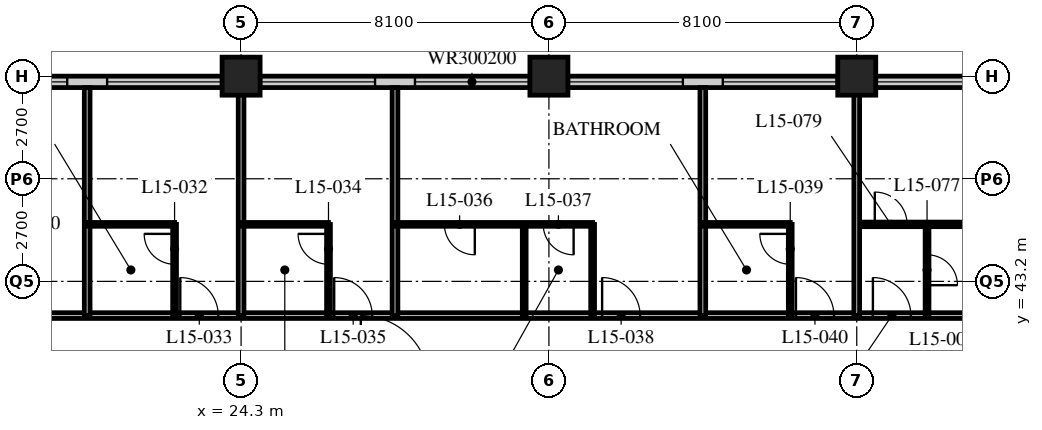
"""IFC4 building model, lengths in metres.
Left out: names, types, materials, properties, quantities, classifications, styles, units other than length and angle.
Written with IfcOpenShell. Run it as: python <this file> out.ifc"""

import sys

from ifc_helpers import new_model, si_unit, direction, frame, frame_2d, origin, origin_2d, place, context, subcontext, project, spatial, rectangle, hollow_rectangle, extrude, element, fill, save


model = new_model("IFC4")
c1 = context("Model", 3, precision=1e-05, world=origin(), true_north=direction((0.0, 1.0)))
c2 = subcontext(c1, "Body", "Model", "MODEL_VIEW")
j1 = project(units=[si_unit("LENGTHUNIT", "METRE"), si_unit("PLANEANGLEUNIT", "RADIAN")], contexts=[c1])
p1 = place(None, origin())
s1 = spatial("IfcSite", under=j1, at=p1, CompositionType="ELEMENT")
p2 = place(p1, origin())
s2 = spatial("IfcBuilding", under=s1, at=p2, CompositionType="ELEMENT")
p3 = place(p2, frame((0.0, 0.0, 63.6)))
s3 = spatial("IfcBuildingStorey", under=s2, at=p3, CompositionType="ELEMENT", Elevation=63.6)
for number, where, z_axis, x_axis in (
    (1, (24.3, 48.6, 0.0), (0.0, 0.0, 1.0), (1.0, 0.0, 0.0)),
    (2, (32.4, 48.6, 0.0), (0.0, 0.0, 1.0), (1.0, 0.0, 0.0)),
    (3, (40.5, 48.6, 0.0), (0.0, 0.0, 1.0), (1.0, 0.0, 0.0)),
):
    element("IfcColumn", number, at=place(p3, frame(where, z_axis=z_axis, x_axis=x_axis)), inside=s3, PredefinedType="COLUMN", context=c2, shape_type="SweptSolid", body=[
        extrude(hollow_rectangle(XDim=1.0, YDim=1.0, WallThickness=0.1, at=origin_2d()), origin(), (0.0, 0.0, 1.0), 3.4),
    ])
p4 = place(p3, frame((48.3, 48.45, 0.0), z_axis=(0.0, 0.0, 1.0), x_axis=(-1.0, 0.0, 0.0)))
e4 = element("IfcWall", 4, at=p4, inside=s3, PredefinedType="SOLIDWALL", context=c2, shape_type="SweptSolid", body=[
    extrude(rectangle(XDim=40.2, YDim=0.3, at=frame_2d((20.1, 0.0))), origin(), (0.0, 0.0, 1.0), 3.19),
])
p5 = place(p4, frame((0.225, 0.0, 0.9)))
e5 = element("IfcOpeningElement", 5, at=p5, cuts=e4, PredefinedType="OPENING", context=c2, shape_type="SweptSolid", body=[
    extrude(rectangle(XDim=3.0, YDim=2.0, at=frame_2d((1.5, 1.0))), frame((0.0, 0.16, 0.0), z_axis=(0.0, -1.0, 0.0), x_axis=(1.0, 0.0, 0.0)), (0.0, 0.0, 1.0), 0.32),
])
p6 = place(p4, frame((4.275, 0.0, 0.9)))
e6 = element("IfcOpeningElement", 6, at=p6, cuts=e4, PredefinedType="OPENING", context=c2, shape_type="SweptSolid", body=[
    extrude(rectangle(XDim=3.0, YDim=2.0, at=frame_2d((1.5, 1.0))), frame((0.0, 0.16, 0.0), z_axis=(0.0, -1.0, 0.0), x_axis=(1.0, 0.0, 0.0)), (0.0, 0.0, 1.0), 0.32),
])
p7 = place(p4, frame((8.325, 0.0, 0.9)))
e7 = element("IfcOpeningElement", 7, at=p7, cuts=e4, PredefinedType="OPENING", context=c2, shape_type="SweptSolid", body=[
    extrude(rectangle(XDim=3.0, YDim=2.0, at=frame_2d((1.5, 1.0))), frame((0.0, 0.16, 0.0), z_axis=(0.0, -1.0, 0.0), x_axis=(1.0, 0.0, 0.0)), (0.0, 0.0, 1.0), 0.32),
])
p8 = place(p4, frame((12.375, 0.0, 0.9)))
e8 = element("IfcOpeningElement", 8, at=p8, cuts=e4, PredefinedType="OPENING", context=c2, shape_type="SweptSolid", body=[
    extrude(rectangle(XDim=3.0, YDim=2.0, at=frame_2d((1.5, 1.0))), frame((0.0, 0.16, 0.0), z_axis=(0.0, -1.0, 0.0), x_axis=(1.0, 0.0, 0.0)), (0.0, 0.0, 1.0), 0.32),
])
p9 = place(p4, frame((16.425, 0.0, 0.9)))
e9 = element("IfcOpeningElement", 9, at=p9, cuts=e4, PredefinedType="OPENING", context=c2, shape_type="SweptSolid", body=[
    extrude(rectangle(XDim=3.0, YDim=2.0, at=frame_2d((1.5, 1.0))), frame((0.0, 0.16, 0.0), z_axis=(0.0, -1.0, 0.0), x_axis=(1.0, 0.0, 0.0)), (0.0, 0.0, 1.0), 0.32),
])
p10 = place(p4, frame((20.475, 0.0, 0.9)))
e10 = element("IfcOpeningElement", 10, at=p10, cuts=e4, PredefinedType="OPENING", context=c2, shape_type="SweptSolid", body=[
    extrude(rectangle(XDim=3.0, YDim=2.0, at=frame_2d((1.5, 1.0))), frame((0.0, 0.16, 0.0), z_axis=(0.0, -1.0, 0.0), x_axis=(1.0, 0.0, 0.0)), (0.0, 0.0, 1.0), 0.32),
])
p11 = place(p4, frame((24.525, 0.0, 0.9)))
e11 = element("IfcOpeningElement", 11, at=p11, cuts=e4, PredefinedType="OPENING", context=c2, shape_type="SweptSolid", body=[
    extrude(rectangle(XDim=3.0, YDim=2.0, at=frame_2d((1.5, 1.0))), frame((0.0, 0.16, 0.0), z_axis=(0.0, -1.0, 0.0), x_axis=(1.0, 0.0, 0.0)), (0.0, 0.0, 1.0), 0.32),
])
p12 = place(p4, frame((28.575, 0.0, 0.9)))
e12 = element("IfcOpeningElement", 12, at=p12, cuts=e4, PredefinedType="OPENING", context=c2, shape_type="SweptSolid", body=[
    extrude(rectangle(XDim=3.0, YDim=2.0, at=frame_2d((1.5, 1.0))), frame((0.0, 0.16, 0.0), z_axis=(0.0, -1.0, 0.0), x_axis=(1.0, 0.0, 0.0)), (0.0, 0.0, 1.0), 0.32),
])
p13 = place(p4, frame((32.625, 0.0, 0.9)))
e13 = element("IfcOpeningElement", 13, at=p13, cuts=e4, PredefinedType="OPENING", context=c2, shape_type="SweptSolid", body=[
    extrude(rectangle(XDim=3.0, YDim=2.0, at=frame_2d((1.5, 1.0))), frame((0.0, 0.16, 0.0), z_axis=(0.0, -1.0, 0.0), x_axis=(1.0, 0.0, 0.0)), (0.0, 0.0, 1.0), 0.32),
])
p14 = place(p4, frame((36.675, 0.0, 0.9)))
e14 = element("IfcOpeningElement", 14, at=p14, cuts=e4, PredefinedType="OPENING", context=c2, shape_type="SweptSolid", body=[
    extrude(rectangle(XDim=3.0, YDim=2.0, at=frame_2d((1.5, 1.0))), frame((0.0, 0.16, 0.0), z_axis=(0.0, -1.0, 0.0), x_axis=(1.0, 0.0, 0.0)), (0.0, 0.0, 1.0), 0.32),
])
p15 = place(p3, frame((8.1, 42.3, 0.0), z_axis=(0.0, 0.0, 1.0), x_axis=(1.0, 0.0, 0.0)))
e15 = element("IfcWall", 15, at=p15, inside=s3, PredefinedType="PARTITIONING", context=c2, shape_type="SweptSolid", body=[
    extrude(rectangle(XDim=36.45, YDim=0.15, at=frame_2d((18.225, 0.0))), origin(), (0.0, 0.0, 1.0), 3.19),
])
p16 = place(p15, frame((9.5, 0.0, 0.0)))
e16 = element("IfcOpeningElement", 16, at=p16, cuts=e15, PredefinedType="OPENING", context=c2, shape_type="SweptSolid", body=[
    extrude(rectangle(XDim=1.0, YDim=2.1, at=frame_2d((0.5, 1.05))), frame((0.0, 0.085, 0.0), z_axis=(0.0, -1.0, 0.0), x_axis=(1.0, 0.0, 0.0)), (0.0, 0.0, 1.0), 0.17),
])
p17 = place(p15, frame((14.6, 0.0, 0.0)))
e17 = element("IfcOpeningElement", 17, at=p17, cuts=e15, PredefinedType="OPENING", context=c2, shape_type="SweptSolid", body=[
    extrude(rectangle(XDim=1.0, YDim=2.1, at=frame_2d((0.5, 1.05))), frame((0.0, 0.085, 0.0), z_axis=(0.0, -1.0, 0.0), x_axis=(1.0, 0.0, 0.0)), (0.0, 0.0, 1.0), 0.17),
])
p18 = place(p15, frame((18.65, 0.0, 0.0)))
e18 = element("IfcOpeningElement", 18, at=p18, cuts=e15, PredefinedType="OPENING", context=c2, shape_type="SweptSolid", body=[
    extrude(rectangle(XDim=1.0, YDim=2.1, at=frame_2d((0.5, 1.05))), frame((0.0, 0.085, 0.0), z_axis=(0.0, -1.0, 0.0), x_axis=(1.0, 0.0, 0.0)), (0.0, 0.0, 1.0), 0.17),
])
p19 = place(p15, frame((25.7, 0.0, 0.0)))
e19 = element("IfcOpeningElement", 19, at=p19, cuts=e15, PredefinedType="OPENING", context=c2, shape_type="SweptSolid", body=[
    extrude(rectangle(XDim=1.0, YDim=2.1, at=frame_2d((0.5, 1.05))), frame((0.0, 0.085, 0.0), z_axis=(0.0, -1.0, 0.0), x_axis=(1.0, 0.0, 0.0)), (0.0, 0.0, 1.0), 0.17),
])
p20 = place(p15, frame((30.8, 0.0, 0.0)))
e20 = element("IfcOpeningElement", 20, at=p20, cuts=e15, PredefinedType="OPENING", context=c2, shape_type="SweptSolid", body=[
    extrude(rectangle(XDim=1.0, YDim=2.1, at=frame_2d((0.5, 1.05))), frame((0.0, 0.085, 0.0), z_axis=(0.0, -1.0, 0.0), x_axis=(1.0, 0.0, 0.0)), (0.0, 0.0, 1.0), 0.17),
])
p21 = place(p15, frame((32.825, 0.0, 0.0)))
e21 = element("IfcOpeningElement", 21, at=p21, cuts=e15, PredefinedType="OPENING", context=c2, shape_type="SweptSolid", body=[
    extrude(rectangle(XDim=1.0, YDim=2.1, at=frame_2d((0.5, 1.05))), frame((0.0, 0.085, 0.0), z_axis=(0.0, -1.0, 0.0), x_axis=(1.0, 0.0, 0.0)), (0.0, 0.0, 1.0), 0.17),
])
p22 = place(p15, frame((2.625, 0.0, 0.0)))
e22 = element("IfcOpeningElement", 22, at=p22, cuts=e15, PredefinedType="OPENING", context=c2, shape_type="SweptSolid", body=[
    extrude(rectangle(XDim=1.0, YDim=2.1, at=frame_2d((0.5, 1.05))), frame((0.0, 0.085, 0.0), z_axis=(0.0, -1.0, 0.0), x_axis=(1.0, 0.0, 0.0)), (0.0, 0.0, 1.0), 0.17),
])
p23 = place(p3, frame((20.25, 42.3, 0.0), z_axis=(0.0, 0.0, 1.0), x_axis=(0.0, 1.0, 0.0)))
e23 = element("IfcWall", 23, at=p23, inside=s3, PredefinedType="PARTITIONING", context=c2, shape_type="SweptSolid", body=[
    extrude(rectangle(XDim=6.0, YDim=0.15, at=frame_2d((3.0, 0.0))), origin(), (0.0, 0.0, 1.0), 3.19),
])
p24 = place(p3, frame((20.25, 44.7, 0.0), z_axis=(0.0, 0.0, 1.0), x_axis=(1.0, 0.0, 0.0)))
e24 = element("IfcWall", 24, at=p24, inside=s3, PredefinedType="PARTITIONING", context=c2, shape_type="SweptSolid", body=[
    extrude(rectangle(XDim=2.3, YDim=0.1, at=frame_2d((1.15, 0.0))), origin(), (0.0, 0.0, 1.0), 3.19),
])
p25 = place(p3, frame((22.55, 42.3, 0.0), z_axis=(0.0, 0.0, 1.0), x_axis=(0.0, 1.0, 0.0)))
e25 = element("IfcWall", 25, at=p25, inside=s3, PredefinedType="PARTITIONING", context=c2, shape_type="SweptSolid", body=[
    extrude(rectangle(XDim=2.4, YDim=0.1, at=frame_2d((1.2, 0.0))), origin(), (0.0, 0.0, 1.0), 3.19),
])
p26 = place(p25, frame((1.35, 0.0, 0.0)))
e26 = element("IfcOpeningElement", 26, at=p26, cuts=e25, PredefinedType="OPENING", context=c2, shape_type="SweptSolid", body=[
    extrude(rectangle(XDim=0.8, YDim=2.1, at=frame_2d((0.4, 1.05))), frame((0.0, 0.06, 0.0), z_axis=(0.0, -1.0, 0.0), x_axis=(1.0, 0.0, 0.0)), (0.0, 0.0, 1.0), 0.12),
])
p27 = place(p3, frame((24.3, 42.3, 0.0), z_axis=(0.0, 0.0, 1.0), x_axis=(0.0, 1.0, 0.0)))
e27 = element("IfcWall", 27, at=p27, inside=s3, PredefinedType="PARTITIONING", context=c2, shape_type="SweptSolid", body=[
    extrude(rectangle(XDim=6.0, YDim=0.15, at=frame_2d((3.0, 0.0))), origin(), (0.0, 0.0, 1.0), 2.578),
])
p28 = place(p3, frame((24.3, 44.7, 0.0), z_axis=(0.0, 0.0, 1.0), x_axis=(1.0, 0.0, 0.0)))
e28 = element("IfcWall", 28, at=p28, inside=s3, PredefinedType="PARTITIONING", context=c2, shape_type="SweptSolid", body=[
    extrude(rectangle(XDim=2.3, YDim=0.1, at=frame_2d((1.15, 0.0))), origin(), (0.0, 0.0, 1.0), 3.19),
])
p29 = place(p3, frame((26.6, 42.3, 0.0), z_axis=(0.0, 0.0, 1.0), x_axis=(0.0, 1.0, 0.0)))
e29 = element("IfcWall", 29, at=p29, inside=s3, PredefinedType="PARTITIONING", context=c2, shape_type="SweptSolid", body=[
    extrude(rectangle(XDim=2.4, YDim=0.1, at=frame_2d((1.2, 0.0))), origin(), (0.0, 0.0, 1.0), 3.19),
])
p30 = place(p29, frame((1.35, 0.0, 0.0)))
e30 = element("IfcOpeningElement", 30, at=p30, cuts=e29, PredefinedType="OPENING", context=c2, shape_type="SweptSolid", body=[
    extrude(rectangle(XDim=0.8, YDim=2.1, at=frame_2d((0.4, 1.05))), frame((0.0, 0.06, 0.0), z_axis=(0.0, -1.0, 0.0), x_axis=(1.0, 0.0, 0.0)), (0.0, 0.0, 1.0), 0.12),
])
p31 = place(p3, frame((28.35, 42.3, 0.0), z_axis=(0.0, 0.0, 1.0), x_axis=(0.0, 1.0, 0.0)))
e31 = element("IfcWall", 31, at=p31, inside=s3, PredefinedType="PARTITIONING", context=c2, shape_type="SweptSolid", body=[
    extrude(rectangle(XDim=6.0, YDim=0.15, at=frame_2d((3.0, 0.0))), origin(), (0.0, 0.0, 1.0), 3.19),
])
p32 = place(p3, frame((28.35, 44.7, 0.0), z_axis=(0.0, 0.0, 1.0), x_axis=(1.0, 0.0, 0.0)))
e32 = element("IfcWall", 32, at=p32, inside=s3, PredefinedType="PARTITIONING", context=c2, shape_type="SweptSolid", body=[
    extrude(rectangle(XDim=5.2, YDim=0.1, at=frame_2d((2.6, 0.0))), origin(), (0.0, 0.0, 1.0), 3.19),
])
p33 = place(p32, frame((1.3, 0.0, 0.0)))
e33 = element("IfcOpeningElement", 33, at=p33, cuts=e32, PredefinedType="OPENING", context=c2, shape_type="SweptSolid", body=[
    extrude(rectangle(XDim=0.8, YDim=2.1, at=frame_2d((0.4, 1.05))), frame((0.0, 0.06, 0.0), z_axis=(0.0, -1.0, 0.0), x_axis=(1.0, 0.0, 0.0)), (0.0, 0.0, 1.0), 0.12),
])
p34 = place(p32, frame((3.9, 0.0, 0.0)))
e34 = element("IfcOpeningElement", 34, at=p34, cuts=e32, PredefinedType="OPENING", context=c2, shape_type="SweptSolid", body=[
    extrude(rectangle(XDim=0.8, YDim=2.1, at=frame_2d((0.4, 1.05))), frame((0.0, 0.06, 0.0), z_axis=(0.0, -1.0, 0.0), x_axis=(1.0, 0.0, 0.0)), (0.0, 0.0, 1.0), 0.12),
])
for number, where, z_axis, x_axis in (
    (35, (31.75, 42.3, 0.0), (0.0, 0.0, 1.0), (0.0, 1.0, 0.0)),
    (36, (33.55, 42.3, 0.0), (0.0, 0.0, 1.0), (0.0, 1.0, 0.0)),
):
    element("IfcWall", number, at=place(p3, frame(where, z_axis=z_axis, x_axis=x_axis)), inside=s3, PredefinedType="PARTITIONING", context=c2, shape_type="SweptSolid", body=[
        extrude(rectangle(XDim=2.4, YDim=0.1, at=frame_2d((1.2, 0.0))), origin(), (0.0, 0.0, 1.0), 3.19),
    ])
p35 = place(p3, frame((36.45, 42.3, 0.0), z_axis=(0.0, 0.0, 1.0), x_axis=(0.0, 1.0, 0.0)))
e37 = element("IfcWall", 37, at=p35, inside=s3, PredefinedType="PARTITIONING", context=c2, shape_type="SweptSolid", body=[
    extrude(rectangle(XDim=6.0, YDim=0.15, at=frame_2d((3.0, 0.0))), origin(), (0.0, 0.0, 1.0), 3.19),
])
p36 = place(p3, frame((36.45, 44.7, 0.0), z_axis=(0.0, 0.0, 1.0), x_axis=(1.0, 0.0, 0.0)))
e38 = element("IfcWall", 38, at=p36, inside=s3, PredefinedType="PARTITIONING", context=c2, shape_type="SweptSolid", body=[
    extrude(rectangle(XDim=2.3, YDim=0.1, at=frame_2d((1.15, 0.0))), origin(), (0.0, 0.0, 1.0), 3.19),
])
p37 = place(p3, frame((38.75, 42.3, 0.0), z_axis=(0.0, 0.0, 1.0), x_axis=(0.0, 1.0, 0.0)))
e39 = element("IfcWall", 39, at=p37, inside=s3, PredefinedType="PARTITIONING", context=c2, shape_type="SweptSolid", body=[
    extrude(rectangle(XDim=2.4, YDim=0.1, at=frame_2d((1.2, 0.0))), origin(), (0.0, 0.0, 1.0), 3.19),
])
p38 = place(p37, frame((1.35, 0.0, 0.0)))
e40 = element("IfcOpeningElement", 40, at=p38, cuts=e39, PredefinedType="OPENING", context=c2, shape_type="SweptSolid", body=[
    extrude(rectangle(XDim=0.8, YDim=2.1, at=frame_2d((0.4, 1.05))), frame((0.0, 0.06, 0.0), z_axis=(0.0, -1.0, 0.0), x_axis=(1.0, 0.0, 0.0)), (0.0, 0.0, 1.0), 0.12),
])
p39 = place(p3, frame((40.5, 44.7, 0.0), z_axis=(0.0, 0.0, 1.0), x_axis=(1.0, 0.0, 0.0)))
e41 = element("IfcWall", 41, at=p39, inside=s3, PredefinedType="PARTITIONING", context=c2, shape_type="SweptSolid", body=[
    extrude(rectangle(XDim=4.05, YDim=0.12, at=frame_2d((2.025, 0.0))), origin(), (0.0, 0.0, 1.0), 3.19),
])
p40 = place(p39, frame((0.475, 0.0, 0.0)))
e42 = element("IfcOpeningElement", 42, at=p40, cuts=e41, PredefinedType="OPENING", context=c2, shape_type="SweptSolid", body=[
    extrude(rectangle(XDim=0.85, YDim=2.1, at=frame_2d((0.425, 1.05))), frame((0.0, 0.07, 0.0), z_axis=(0.0, -1.0, 0.0), x_axis=(1.0, 0.0, 0.0)), (0.0, 0.0, 1.0), 0.14),
])
p41 = place(p3, frame((42.35, 42.3, 0.0), z_axis=(0.0, 0.0, 1.0), x_axis=(0.0, 1.0, 0.0)))
e43 = element("IfcWall", 43, at=p41, inside=s3, PredefinedType="PARTITIONING", context=c2, shape_type="SweptSolid", body=[
    extrude(rectangle(XDim=2.4, YDim=0.1, at=frame_2d((1.2, 0.0))), origin(), (0.0, 0.0, 1.0), 3.19),
])
p42 = place(p41, frame((0.8, 0.0, 0.0)))
e44 = element("IfcOpeningElement", 44, at=p42, cuts=e43, PredefinedType="OPENING", context=c2, shape_type="SweptSolid", body=[
    extrude(rectangle(XDim=0.8, YDim=2.1, at=frame_2d((0.4, 1.05))), frame((0.0, 0.06, 0.0), z_axis=(0.0, -1.0, 0.0), x_axis=(1.0, 0.0, 0.0)), (0.0, 0.0, 1.0), 0.12),
])
p43 = place(p3, frame((40.5, 42.3, 0.0), z_axis=(0.0, 0.0, 1.0), x_axis=(0.0, 1.0, 0.0)))
e45 = element("IfcWall", 45, at=p43, inside=s3, PredefinedType="PARTITIONING", context=c2, shape_type="SweptSolid", body=[
    extrude(rectangle(XDim=6.0, YDim=0.15, at=frame_2d((3.0, 0.0))), origin(), (0.0, 0.0, 1.0), 2.578),
])
p44 = place(p6, origin())
e46 = element("IfcWindow", 46, at=p44, inside=s3, PartitioningType="SINGLE_PANEL", PredefinedType="WINDOW", context=c2, shape_type="SweptSolid", body=[
    extrude(rectangle(XDim=3.0, YDim=2.0, at=frame_2d((1.5, 1.0))), frame((0.0, 0.03, 0.0), z_axis=(0.0, -1.0, 0.0), x_axis=(1.0, 0.0, 0.0)), (0.0, 0.0, 1.0), 0.06),
])
fill(e6, e46)
p45 = place(p7, origin())
e47 = element("IfcWindow", 47, at=p45, inside=s3, PartitioningType="SINGLE_PANEL", PredefinedType="WINDOW", context=c2, shape_type="SweptSolid", body=[
    extrude(rectangle(XDim=3.0, YDim=2.0, at=frame_2d((1.5, 1.0))), frame((0.0, 0.03, 0.0), z_axis=(0.0, -1.0, 0.0), x_axis=(1.0, 0.0, 0.0)), (0.0, 0.0, 1.0), 0.06),
])
fill(e7, e47)
p46 = place(p8, origin())
e48 = element("IfcWindow", 48, at=p46, inside=s3, PartitioningType="SINGLE_PANEL", PredefinedType="WINDOW", context=c2, shape_type="SweptSolid", body=[
    extrude(rectangle(XDim=3.0, YDim=2.0, at=frame_2d((1.5, 1.0))), frame((0.0, 0.03, 0.0), z_axis=(0.0, -1.0, 0.0), x_axis=(1.0, 0.0, 0.0)), (0.0, 0.0, 1.0), 0.06),
])
fill(e8, e48)
p47 = place(p9, origin())
e49 = element("IfcWindow", 49, at=p47, inside=s3, PartitioningType="SINGLE_PANEL", PredefinedType="WINDOW", context=c2, shape_type="SweptSolid", body=[
    extrude(rectangle(XDim=3.0, YDim=2.0, at=frame_2d((1.5, 1.0))), frame((0.0, 0.03, 0.0), z_axis=(0.0, -1.0, 0.0), x_axis=(1.0, 0.0, 0.0)), (0.0, 0.0, 1.0), 0.06),
])
fill(e9, e49)
p48 = place(p10, origin())
e50 = element("IfcWindow", 50, at=p48, inside=s3, PartitioningType="SINGLE_PANEL", PredefinedType="WINDOW", context=c2, shape_type="SweptSolid", body=[
    extrude(rectangle(XDim=3.0, YDim=2.0, at=frame_2d((1.5, 1.0))), frame((0.0, 0.03, 0.0), z_axis=(0.0, -1.0, 0.0), x_axis=(1.0, 0.0, 0.0)), (0.0, 0.0, 1.0), 0.06),
])
fill(e10, e50)
p49 = place(p11, origin())
e51 = element("IfcWindow", 51, at=p49, inside=s3, PartitioningType="SINGLE_PANEL", PredefinedType="WINDOW", context=c2, shape_type="SweptSolid", body=[
    extrude(rectangle(XDim=3.0, YDim=2.0, at=frame_2d((1.5, 1.0))), frame((0.0, 0.03, 0.0), z_axis=(0.0, -1.0, 0.0), x_axis=(1.0, 0.0, 0.0)), (0.0, 0.0, 1.0), 0.06),
])
fill(e11, e51)
p50 = place(p12, origin())
e52 = element("IfcWindow", 52, at=p50, inside=s3, PartitioningType="SINGLE_PANEL", PredefinedType="WINDOW", context=c2, shape_type="SweptSolid", body=[
    extrude(rectangle(XDim=3.0, YDim=2.0, at=frame_2d((1.5, 1.0))), frame((0.0, 0.03, 0.0), z_axis=(0.0, -1.0, 0.0), x_axis=(1.0, 0.0, 0.0)), (0.0, 0.0, 1.0), 0.06),
])
fill(e12, e52)
p51 = place(p26, origin())
e53 = element("IfcDoor", 53, at=p51, inside=s3, OperationType="SINGLE_SWING_RIGHT", PredefinedType="DOOR", context=c2, shape_type="SweptSolid", body=[
    extrude(rectangle(XDim=0.8, YDim=2.1, at=frame_2d((0.4, 1.05))), frame((0.0, 0.025, 0.0), z_axis=(0.0, -1.0, 0.0), x_axis=(1.0, 0.0, 0.0)), (0.0, 0.0, 1.0), 0.05),
])
fill(e26, e53)
p52 = place(p17, origin())
e54 = element("IfcDoor", 54, at=p52, inside=s3, OperationType="SINGLE_SWING_LEFT", PredefinedType="DOOR", context=c2, shape_type="SweptSolid", body=[
    extrude(rectangle(XDim=1.0, YDim=2.1, at=frame_2d((0.5, 1.05))), frame((0.0, 0.025, 0.0), z_axis=(0.0, -1.0, 0.0), x_axis=(1.0, 0.0, 0.0)), (0.0, 0.0, 1.0), 0.05),
])
fill(e17, e54)
p53 = place(p30, origin())
e55 = element("IfcDoor", 55, at=p53, inside=s3, OperationType="SINGLE_SWING_RIGHT", PredefinedType="DOOR", context=c2, shape_type="SweptSolid", body=[
    extrude(rectangle(XDim=0.8, YDim=2.1, at=frame_2d((0.4, 1.05))), frame((0.0, 0.025, 0.0), z_axis=(0.0, -1.0, 0.0), x_axis=(1.0, 0.0, 0.0)), (0.0, 0.0, 1.0), 0.05),
])
fill(e30, e55)
p54 = place(p18, origin())
e56 = element("IfcDoor", 56, at=p54, inside=s3, OperationType="SINGLE_SWING_LEFT", PredefinedType="DOOR", context=c2, shape_type="SweptSolid", body=[
    extrude(rectangle(XDim=1.0, YDim=2.1, at=frame_2d((0.5, 1.05))), frame((0.0, 0.025, 0.0), z_axis=(0.0, -1.0, 0.0), x_axis=(1.0, 0.0, 0.0)), (0.0, 0.0, 1.0), 0.05),
])
fill(e18, e56)
p55 = place(p33, origin())
e57 = element("IfcDoor", 57, at=p55, inside=s3, OperationType="SINGLE_SWING_LEFT", PredefinedType="DOOR", context=c2, shape_type="SweptSolid", body=[
    extrude(rectangle(XDim=0.8, YDim=2.1, at=frame_2d((0.4, 1.05))), frame((0.0, 0.025, 0.0), z_axis=(0.0, -1.0, 0.0), x_axis=(1.0, 0.0, 0.0)), (0.0, 0.0, 1.0), 0.05),
])
fill(e33, e57)
p56 = place(p34, origin())
e58 = element("IfcDoor", 58, at=p56, inside=s3, OperationType="SINGLE_SWING_LEFT", PredefinedType="DOOR", context=c2, shape_type="SweptSolid", body=[
    extrude(rectangle(XDim=0.8, YDim=2.1, at=frame_2d((0.4, 1.05))), frame((0.0, 0.025, 0.0), z_axis=(0.0, -1.0, 0.0), x_axis=(1.0, 0.0, 0.0)), (0.0, 0.0, 1.0), 0.05),
])
fill(e34, e58)
p57 = place(p19, origin())
e59 = element("IfcDoor", 59, at=p57, inside=s3, OperationType="SINGLE_SWING_LEFT", PredefinedType="DOOR", context=c2, shape_type="SweptSolid", body=[
    extrude(rectangle(XDim=1.0, YDim=2.1, at=frame_2d((0.5, 1.05))), frame((0.0, 0.025, 0.0), z_axis=(0.0, -1.0, 0.0), x_axis=(1.0, 0.0, 0.0)), (0.0, 0.0, 1.0), 0.05),
])
fill(e19, e59)
p58 = place(p38, origin())
e60 = element("IfcDoor", 60, at=p58, inside=s3, OperationType="SINGLE_SWING_RIGHT", PredefinedType="DOOR", context=c2, shape_type="SweptSolid", body=[
    extrude(rectangle(XDim=0.8, YDim=2.1, at=frame_2d((0.4, 1.05))), frame((0.0, 0.025, 0.0), z_axis=(0.0, -1.0, 0.0), x_axis=(1.0, 0.0, 0.0)), (0.0, 0.0, 1.0), 0.05),
])
fill(e40, e60)
p59 = place(p20, origin())
e61 = element("IfcDoor", 61, at=p59, inside=s3, OperationType="SINGLE_SWING_LEFT", PredefinedType="DOOR", context=c2, shape_type="SweptSolid", body=[
    extrude(rectangle(XDim=1.0, YDim=2.1, at=frame_2d((0.5, 1.05))), frame((0.0, 0.025, 0.0), z_axis=(0.0, -1.0, 0.0), x_axis=(1.0, 0.0, 0.0)), (0.0, 0.0, 1.0), 0.05),
])
fill(e20, e61)
p60 = place(p42, origin())
e62 = element("IfcDoor", 62, at=p60, inside=s3, OperationType="SINGLE_SWING_RIGHT", PredefinedType="DOOR", context=c2, shape_type="SweptSolid", body=[
    extrude(rectangle(XDim=0.8, YDim=2.1, at=frame_2d((0.4, 1.05))), frame((0.0, 0.025, 0.0), z_axis=(0.0, -1.0, 0.0), x_axis=(1.0, 0.0, 0.0)), (0.0, 0.0, 1.0), 0.05),
])
fill(e44, e62)
p61 = place(p21, origin())
e63 = element("IfcDoor", 63, at=p61, inside=s3, OperationType="SINGLE_SWING_LEFT", PredefinedType="DOOR", context=c2, shape_type="SweptSolid", body=[
    extrude(rectangle(XDim=1.0, YDim=2.1, at=frame_2d((0.5, 1.05))), frame((0.0, 0.025, 0.0), z_axis=(0.0, -1.0, 0.0), x_axis=(1.0, 0.0, 0.0)), (0.0, 0.0, 1.0), 0.05),
])
fill(e21, e63)
p62 = place(p40, origin())
e64 = element("IfcDoor", 64, at=p62, inside=s3, OperationType="SINGLE_SWING_LEFT", PredefinedType="DOOR", context=c2, shape_type="SweptSolid", body=[
    extrude(rectangle(XDim=0.85, YDim=2.1, at=frame_2d((0.425, 1.05))), frame((0.0, 0.025, 0.0), z_axis=(0.0, -1.0, 0.0), x_axis=(1.0, 0.0, 0.0)), (0.0, 0.0, 1.0), 0.05),
])
fill(e42, e64)
save(model, sys.argv[1])
